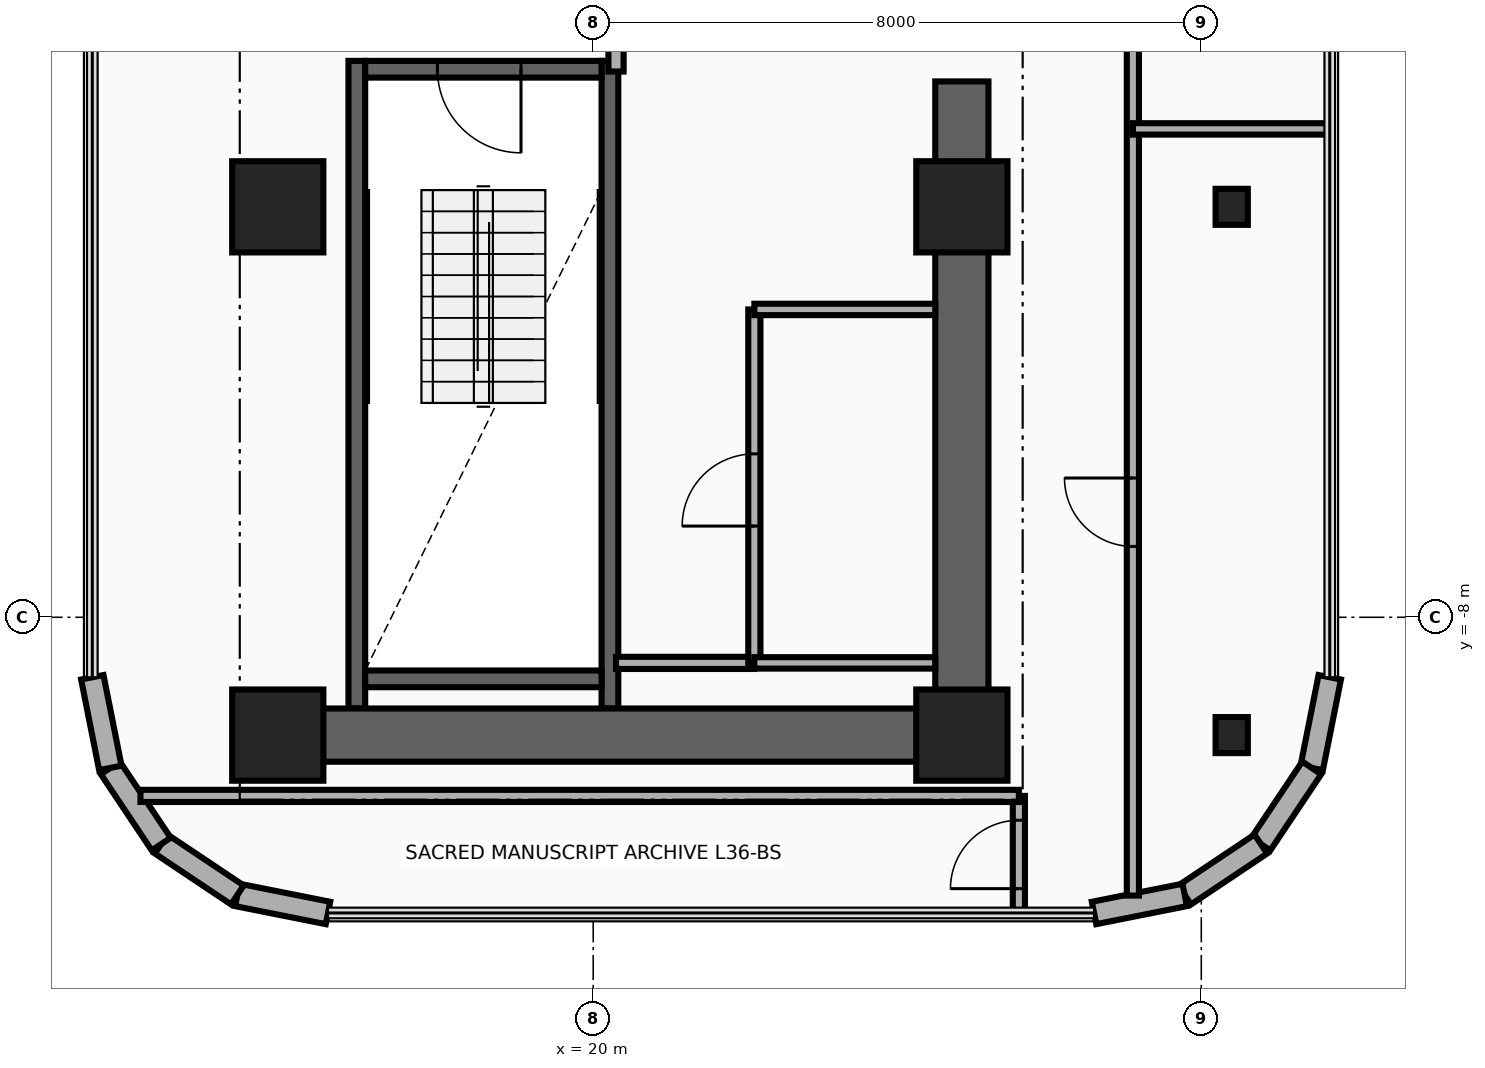
"""IFC4 building model, lengths in metres.
Left out: names, types, materials, properties, quantities, classifications, styles, units other than length and angle.
Written with IfcOpenShell. Run it as: python <this file> out.ifc"""

import sys

from ifc_helpers import new_model, si_unit, direction, frame, frame_2d, origin, origin_2d, place, context, subcontext, project, spatial, rectangle, i_section, extrude, source, transform, mapped, element, fill, save


model = new_model("IFC4")
c1 = context("Model", 3, precision=1e-05, world=origin(), true_north=direction((0.0, 1.0)))
c2 = subcontext(c1, "Body", "Model", "MODEL_VIEW")
j1 = project(units=[si_unit("LENGTHUNIT", "METRE"), si_unit("PLANEANGLEUNIT", "RADIAN")], contexts=[c1])
p1 = place(None, origin())
s1 = spatial("IfcSite", under=j1, at=p1, CompositionType="ELEMENT")
p2 = place(p1, origin())
s2 = spatial("IfcBuilding", under=s1, at=p2, CompositionType="ELEMENT")
p3 = place(p2, frame((0.0, 0.0, 142.7)))
s3 = spatial("IfcBuildingStorey", under=s2, at=p3, CompositionType="ELEMENT", Elevation=142.7)
for number, where, z_axis, x_axis in (
    (1, (16.89, -9.2, 0.0), (0.0, 0.0, 1.0), (0.0, 1.0, 0.0)),
    (2, (20.22, -9.2, 0.0), (0.0, 0.0, 1.0), (0.0, 1.0, 0.0)),
):
    element("IfcWall", number, at=place(p3, frame(where, z_axis=z_axis, x_axis=x_axis)), inside=s3, PredefinedType="SHEAR", context=c2, shape_type="SweptSolid", body=[
        extrude(rectangle(XDim=8.52, YDim=0.22, at=frame_2d((4.26, 0.0))), origin(), (0.0, 0.0, 1.0), 3.46),
    ])
p4 = place(p3, frame((17.0, -8.81, 0.0), z_axis=(0.0, 0.0, 1.0), x_axis=(1.0, 0.0, 0.0)))
e3 = element("IfcWall", 3, at=p4, inside=s3, PredefinedType="SHEAR", context=c2, shape_type="SweptSolid", body=[
    extrude(rectangle(XDim=3.11, YDim=0.22, at=frame_2d((1.555, 0.0))), origin(), (0.0, 0.0, 1.0), 3.46),
])
p5 = place(p3, frame((17.0, -0.79, 0.0), z_axis=(0.0, 0.0, 1.0), x_axis=(1.0, 0.0, 0.0)))
e4 = element("IfcWall", 4, at=p5, inside=s3, PredefinedType="SHEAR", context=c2, shape_type="SweptSolid", body=[
    extrude(rectangle(XDim=3.11, YDim=0.22, at=frame_2d((1.555, 0.0))), origin(), (0.0, 0.0, 1.0), 3.46),
])
p6 = place(p5, frame((0.95, 0.0, 0.0)))
e5 = element("IfcOpeningElement", 5, at=p6, cuts=e4, PredefinedType="OPENING", context=c2, shape_type="SweptSolid", body=[
    extrude(rectangle(XDim=1.1, YDim=2.15, at=frame_2d((0.55, 1.075))), frame((0.0, 0.125, 0.0), z_axis=(0.0, -1.0, 0.0), x_axis=(1.0, 0.0, 0.0)), (0.0, 0.0, 1.0), 0.25),
])
p7 = place(p3, frame((24.85, -9.9, 0.0), z_axis=(0.0, 0.0, 1.0), x_axis=(0.0, 1.0, 0.0)))
e6 = element("IfcWall", 6, at=p7, inside=s3, PredefinedType="SHEAR", context=c2, shape_type="SweptSolid", body=[
    extrude(rectangle(XDim=8.95, YDim=0.7, at=frame_2d((4.475, 0.0))), origin(), (0.0, 0.0, 1.0), 3.46),
])
p8 = place(p3, frame((15.85, -9.55, 0.0), z_axis=(0.0, 0.0, 1.0), x_axis=(1.0, 0.0, 0.0)))
e7 = element("IfcWall", 7, at=p8, inside=s3, PredefinedType="SHEAR", context=c2, shape_type="SweptSolid", body=[
    extrude(rectangle(XDim=9.0, YDim=0.7, at=frame_2d((4.5, 0.0))), origin(), (0.0, 0.0, 1.0), 3.46),
])
m1 = source(origin(), c2, "Body", "SweptSolid", [
    extrude(rectangle(XDim=1.2, YDim=1.2, at=origin_2d()), origin(), (0.0, 0.0, 1.0), 3.7),
])
for number, where, z_axis, x_axis in (
    (8, (15.85, -9.55, 0.0), (0.0, 0.0, 1.0), (1.0, 0.0, 0.0)),
    (9, (24.85, -9.55, 0.0), (0.0, 0.0, 1.0), (1.0, 0.0, 0.0)),
):
    element("IfcColumn", number, at=place(p3, frame(where, z_axis=z_axis, x_axis=x_axis)), inside=s3, PredefinedType="COLUMN", context=c2, shape_type="MappedRepresentation", body=[
        mapped(m1, transform((0.0, 0.0, 0.0), x_axis=(1.0, 0.0, 0.0), y_axis=(0.0, 1.0, 0.0), z_axis=(0.0, 0.0, 1.0), scale=1.0)),
    ])
m2 = source(origin(), c2, "Body", "SweptSolid", [
    extrude(i_section(OverallWidth=0.424, OverallDepth=0.474, WebThickness=0.048, FlangeThickness=0.077, at=origin_2d()), origin(), (0.0, 0.0, 1.0), 3.7),
])
p9 = place(p3, frame((28.4, -9.55, 0.0), z_axis=(0.0, 0.0, 1.0), x_axis=(1.0, 0.0, 0.0)))
e10 = element("IfcColumn", 10, at=p9, inside=s3, PredefinedType="COLUMN", context=c2, shape_type="MappedRepresentation", body=[
    mapped(m2, transform((0.0, 0.0, 0.0), x_axis=(1.0, 0.0, 0.0), y_axis=(0.0, 1.0, 0.0), z_axis=(0.0, 0.0, 1.0), scale=1.0)),
])
for number, where, z_axis, x_axis in (
    (11, (15.85, -2.6, 0.0), (0.0, 0.0, 1.0), (1.0, 0.0, 0.0)),
    (12, (24.85, -2.6, 0.0), (0.0, 0.0, 1.0), (1.0, 0.0, 0.0)),
):
    element("IfcColumn", number, at=place(p3, frame(where, z_axis=z_axis, x_axis=x_axis)), inside=s3, PredefinedType="COLUMN", context=c2, shape_type="MappedRepresentation", body=[
        mapped(m1, transform((0.0, 0.0, 0.0), x_axis=(1.0, 0.0, 0.0), y_axis=(0.0, 1.0, 0.0), z_axis=(0.0, 0.0, 1.0), scale=1.0)),
    ])
p10 = place(p3, frame((28.4, -2.6, 0.0), z_axis=(0.0, 0.0, 1.0), x_axis=(1.0, 0.0, 0.0)))
e13 = element("IfcColumn", 13, at=p10, inside=s3, PredefinedType="COLUMN", context=c2, shape_type="MappedRepresentation", body=[
    mapped(m2, transform((0.0, 0.0, 0.0), x_axis=(1.0, 0.0, 0.0), y_axis=(0.0, 1.0, 0.0), z_axis=(0.0, 0.0, 1.0), scale=1.0)),
])
p11 = place(p3, frame((29.69, -8.789, 0.0), z_axis=(0.0, 0.0, 1.0), x_axis=(-0.194996050505, -0.980804027463, 0.0)))
e14 = element("IfcWall", 14, at=p11, inside=s3, PredefinedType="SOLIDWALL", context=c2, shape_type="SweptSolid", body=[
    extrude(rectangle(XDim=1.216, YDim=0.3, at=frame_2d((0.608, 0.0))), origin(), (0.0, 0.0, 1.0), 3.46),
])
for number, where, z_axis, x_axis in (
    (15, (29.453, -9.982, 0.0), (0.0, 0.0, 1.0), (-0.556, -0.831, 0.0)),
    (16, (28.783, -10.983, 0.0), (0.0, 0.0, 1.0), (-0.831, -0.556, 0.0)),
):
    element("IfcWall", number, at=place(p3, frame(where, z_axis=z_axis, x_axis=x_axis)), inside=s3, PredefinedType="SOLIDWALL", context=c2, shape_type="SweptSolid", body=[
        extrude(rectangle(XDim=1.205, YDim=0.3, at=frame_2d((0.603, 0.0))), origin(), (0.0, 0.0, 1.0), 3.46),
    ])
p12 = place(p3, frame((27.782, -11.653, 0.0), z_axis=(0.0, 0.0, 1.0), x_axis=(-0.980811661072, -0.194957650543, 0.0)))
e17 = element("IfcWall", 17, at=p12, inside=s3, PredefinedType="SOLIDWALL", context=c2, shape_type="SweptSolid", body=[
    extrude(rectangle(XDim=1.216, YDim=0.3, at=frame_2d((0.608, 0.0))), origin(), (0.0, 0.0, 1.0), 3.46),
])
p13 = place(p3, frame((16.511, -11.89, 0.0), z_axis=(0.0, 0.0, 1.0), x_axis=(-0.980804027463, 0.194996050505, 0.0)))
e18 = element("IfcWall", 18, at=p13, inside=s3, PredefinedType="SOLIDWALL", context=c2, shape_type="SweptSolid", body=[
    extrude(rectangle(XDim=1.216, YDim=0.3, at=frame_2d((0.608, 0.0))), origin(), (0.0, 0.0, 1.0), 3.46),
])
for number, where, z_axis, x_axis in (
    (19, (15.318, -11.653, 0.0), (0.0, 0.0, 1.0), (-0.831, 0.556, 0.0)),
    (20, (14.317, -10.983, 0.0), (0.0, 0.0, 1.0), (-0.556, 0.831, 0.0)),
):
    element("IfcWall", number, at=place(p3, frame(where, z_axis=z_axis, x_axis=x_axis)), inside=s3, PredefinedType="SOLIDWALL", context=c2, shape_type="SweptSolid", body=[
        extrude(rectangle(XDim=1.205, YDim=0.3, at=frame_2d((0.603, 0.0))), origin(), (0.0, 0.0, 1.0), 3.46),
    ])
p14 = place(p3, frame((13.647, -9.982, 0.0), z_axis=(0.0, 0.0, 1.0), x_axis=(-0.195189223115, 0.980765602568, 0.0)))
e21 = element("IfcWall", 21, at=p14, inside=s3, PredefinedType="SOLIDWALL", context=c2, shape_type="SweptSolid", body=[
    extrude(rectangle(XDim=1.216, YDim=0.3, at=frame_2d((0.608, 0.0))), origin(), (0.0, 0.0, 1.0), 3.46),
])
p15 = place(p3, frame((20.3, -0.82, 0.0), z_axis=(0.0, 0.0, 1.0), x_axis=(0.0, 1.0, 0.0)))
e22 = element("IfcWall", 22, at=p15, inside=s3, PredefinedType="PARTITIONING", context=c2, shape_type="SweptSolid", body=[
    extrude(rectangle(XDim=1.64, YDim=0.2, at=frame_2d((0.82, 0.0))), origin(), (0.0, 0.0, 1.0), 3.46),
])
p16 = place(p15, frame((0.295, 0.0, 0.0)))
e23 = element("IfcOpeningElement", 23, at=p16, cuts=e22, PredefinedType="OPENING", context=c2, shape_type="SweptSolid", body=[
    extrude(rectangle(XDim=1.05, YDim=2.15, at=frame_2d((0.525, 1.075))), frame((0.0, 0.115, 0.0), z_axis=(0.0, -1.0, 0.0), x_axis=(1.0, 0.0, 0.0)), (0.0, 0.0, 1.0), 0.23),
])
p17 = place(p3, frame((20.3, -8.6, 0.0), z_axis=(0.0, 0.0, 1.0), x_axis=(1.0, 0.0, 0.0)))
e24 = element("IfcWall", 24, at=p17, inside=s3, PredefinedType="PARTITIONING", context=c2, shape_type="SweptSolid", body=[
    extrude(rectangle(XDim=1.82, YDim=0.16, at=frame_2d((0.91, 0.0))), origin(), (0.0, 0.0, 1.0), 3.46),
])
p18 = place(p3, frame((22.12, -8.6, 0.0), z_axis=(0.0, 0.0, 1.0), x_axis=(0.0, 1.0, 0.0)))
e25 = element("IfcWall", 25, at=p18, inside=s3, PredefinedType="PARTITIONING", context=c2, shape_type="SweptSolid", body=[
    extrude(rectangle(XDim=4.65, YDim=0.16, at=frame_2d((2.325, 0.0))), origin(), (0.0, 0.0, 1.0), 3.46),
])
p19 = place(p18, frame((1.8, 0.0, 0.0)))
e26 = element("IfcOpeningElement", 26, at=p19, cuts=e25, PredefinedType="OPENING", context=c2, shape_type="SweptSolid", body=[
    extrude(rectangle(XDim=0.95, YDim=2.15, at=frame_2d((0.475, 1.075))), frame((0.0, 0.095, 0.0), z_axis=(0.0, -1.0, 0.0), x_axis=(1.0, 0.0, 0.0)), (0.0, 0.0, 1.0), 0.19),
])
for number, where, z_axis, x_axis in (
    (27, (22.12, -3.95, 0.0), (0.0, 0.0, 1.0), (1.0, 0.0, 0.0)),
    (28, (22.12, -8.6, 0.0), (0.0, 0.0, 1.0), (1.0, 0.0, 0.0)),
):
    element("IfcWall", number, at=place(p3, frame(where, z_axis=z_axis, x_axis=x_axis)), inside=s3, PredefinedType="PARTITIONING", context=c2, shape_type="SweptSolid", body=[
        extrude(rectangle(XDim=2.38, YDim=0.15, at=frame_2d((1.19, 0.0))), origin(), (0.0, 0.0, 1.0), 3.46),
    ])
p20 = place(p3, frame((25.6, -11.89, 0.0), z_axis=(0.0, 0.0, 1.0), x_axis=(0.0, 1.0, 0.0)))
e29 = element("IfcWall", 29, at=p20, inside=s3, PredefinedType="PARTITIONING", context=c2, shape_type="SweptSolid", body=[
    extrude(rectangle(XDim=1.54, YDim=0.16, at=frame_2d((0.77, 0.0))), origin(), (0.0, 0.0, 1.0), 3.46),
])
p21 = place(p20, frame((0.32, 0.0, 0.0)))
e30 = element("IfcOpeningElement", 30, at=p21, cuts=e29, PredefinedType="OPENING", context=c2, shape_type="SweptSolid", body=[
    extrude(rectangle(XDim=0.9, YDim=2.1, at=frame_2d((0.45, 1.05))), frame((0.0, 0.095, 0.0), z_axis=(0.0, -1.0, 0.0), x_axis=(1.0, 0.0, 0.0)), (0.0, 0.0, 1.0), 0.19),
])
p22 = place(p3, frame((14.044, -10.35, 0.0), z_axis=(0.0, 0.0, 1.0), x_axis=(1.0, 0.0, 0.0)))
e31 = element("IfcWall", 31, at=p22, inside=s3, PredefinedType="PARTITIONING", context=c2, shape_type="SweptSolid", body=[
    extrude(rectangle(XDim=11.556, YDim=0.16, at=frame_2d((5.778, 0.0))), origin(), (0.0, 0.0, 1.0), 3.46),
])
p23 = place(p3, frame((27.1, -11.661, 0.0), z_axis=(0.0, 0.0, 1.0), x_axis=(0.0, 1.0, 0.0)))
e32 = element("IfcWall", 32, at=p23, inside=s3, PredefinedType="PARTITIONING", context=c2, shape_type="SweptSolid", body=[
    extrude(rectangle(XDim=23.511, YDim=0.16, at=frame_2d((11.755, 0.0))), origin(), (0.0, 0.0, 1.0), 2.666),
])
p24 = place(p23, frame((4.593, 0.0, 0.0)))
e33 = element("IfcOpeningElement", 33, at=p24, cuts=e32, PredefinedType="OPENING", context=c2, shape_type="SweptSolid", body=[
    extrude(rectangle(XDim=0.9, YDim=2.1, at=frame_2d((0.45, 1.05))), frame((0.0, 0.095, 0.0), z_axis=(0.0, -1.0, 0.0), x_axis=(1.0, 0.0, 0.0)), (0.0, 0.0, 1.0), 0.19),
])
p25 = place(p23, frame((16.348, 0.0, 0.0)))
e34 = element("IfcOpeningElement", 34, at=p25, cuts=e32, PredefinedType="OPENING", context=c2, shape_type="SweptSolid", body=[
    extrude(rectangle(XDim=0.9, YDim=2.1, at=frame_2d((0.45, 1.05))), frame((0.0, 0.095, 0.0), z_axis=(0.0, -1.0, 0.0), x_axis=(1.0, 0.0, 0.0)), (0.0, 0.0, 1.0), 0.19),
])
p26 = place(p3, frame((27.1, -1.575, 0.0), z_axis=(0.0, 0.0, 1.0), x_axis=(1.0, 0.0, 0.0)))
e35 = element("IfcWall", 35, at=p26, inside=s3, PredefinedType="PARTITIONING", context=c2, shape_type="SweptSolid", body=[
    extrude(rectangle(XDim=2.59, YDim=0.15, at=frame_2d((1.295, 0.0))), origin(), (0.0, 0.0, 1.0), 2.896),
])
p27 = place(p6, frame((1.1, 0.0, 0.0), z_axis=(0.0, 0.0, 1.0), x_axis=(-1.0, 0.0, 0.0)))
e36 = element("IfcDoor", 36, at=p27, inside=s3, OperationType="SINGLE_SWING_LEFT", PredefinedType="DOOR", context=c2, shape_type="SweptSolid", body=[
    extrude(rectangle(XDim=1.1, YDim=2.15, at=frame_2d((0.55, 1.075))), frame((0.0, 0.025, 0.0), z_axis=(0.0, -1.0, 0.0), x_axis=(1.0, 0.0, 0.0)), (0.0, 0.0, 1.0), 0.05),
])
fill(e5, e36)
p28 = place(p19, origin())
e37 = element("IfcDoor", 37, at=p28, inside=s3, OperationType="SINGLE_SWING_LEFT", PredefinedType="DOOR", context=c2, shape_type="SweptSolid", body=[
    extrude(rectangle(XDim=0.95, YDim=2.15, at=frame_2d((0.475, 1.075))), frame((0.0, 0.025, 0.0), z_axis=(0.0, -1.0, 0.0), x_axis=(1.0, 0.0, 0.0)), (0.0, 0.0, 1.0), 0.05),
])
fill(e26, e37)
p29 = place(p21, origin())
e38 = element("IfcDoor", 38, at=p29, inside=s3, OperationType="SINGLE_SWING_RIGHT", PredefinedType="DOOR", context=c2, shape_type="SweptSolid", body=[
    extrude(rectangle(XDim=0.9, YDim=2.1, at=frame_2d((0.45, 1.05))), frame((0.0, 0.025, 0.0), z_axis=(0.0, -1.0, 0.0), x_axis=(1.0, 0.0, 0.0)), (0.0, 0.0, 1.0), 0.05),
])
fill(e30, e38)
p30 = place(p24, origin())
e39 = element("IfcDoor", 39, at=p30, inside=s3, OperationType="SINGLE_SWING_RIGHT", PredefinedType="DOOR", context=c2, shape_type="SweptSolid", body=[
    extrude(rectangle(XDim=0.9, YDim=2.1, at=frame_2d((0.45, 1.05))), frame((0.0, 0.025, 0.0), z_axis=(0.0, -1.0, 0.0), x_axis=(1.0, 0.0, 0.0)), (0.0, 0.0, 1.0), 0.05),
])
fill(e33, e39)
save(model, sys.argv[1])
